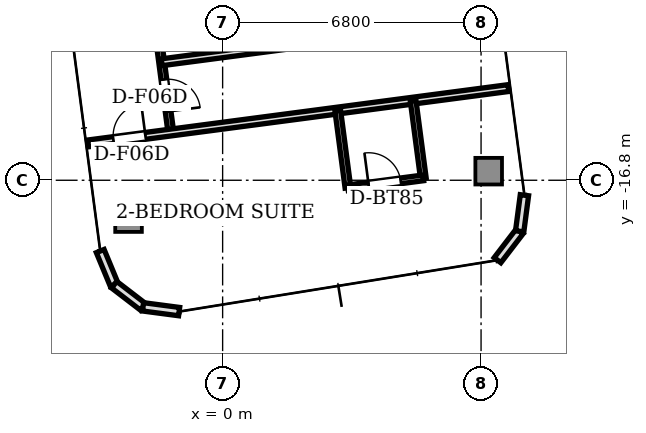
"""IFC4 building model, lengths in metres.
Left out: names, types, materials, properties, quantities, classifications, styles, units other than length and angle.
Written with IfcOpenShell. Run it as: python <this file> out.ifc"""

import sys

from ifc_helpers import new_model, si_unit, direction, frame, frame_2d, origin, origin_2d, place, context, subcontext, project, spatial, rectangle, extrude, source, transform, mapped, element, fill, save


model = new_model("IFC4")
c1 = context("Model", 3, precision=1e-05, world=origin(), true_north=direction((0.0, 1.0)))
c2 = subcontext(c1, "Body", "Model", "MODEL_VIEW")
j1 = project(units=[si_unit("LENGTHUNIT", "METRE"), si_unit("PLANEANGLEUNIT", "RADIAN")], contexts=[c1])
p1 = place(None, origin())
s1 = spatial("IfcSite", under=j1, at=p1, CompositionType="ELEMENT")
p2 = place(p1, origin())
s2 = spatial("IfcBuilding", under=s1, at=p2, CompositionType="ELEMENT")
p3 = place(p2, frame((0.0, 0.0, 234.45)))
s3 = spatial("IfcBuildingStorey", under=s2, at=p3, CompositionType="ELEMENT", Elevation=234.45)
m1 = source(origin(), c2, "Body", "SweptSolid", [
    extrude(rectangle(XDim=0.7, YDim=0.7, at=origin_2d()), origin(), (0.0, 0.0, 1.0), 3.11),
])
for number, where, z_axis, x_axis in (
    (1, (-2.476, -17.809, 0.0), (0.0, 0.0, 1.0), (1.0, 0.0, 0.0)),
    (2, (7.0, -16.561, 0.0), (0.0, 0.0, 1.0), (1.0, 0.0, 0.0)),
):
    element("IfcColumn", number, at=place(p3, frame(where, z_axis=z_axis, x_axis=x_axis)), inside=s3, PredefinedType="COLUMN", context=c2, shape_type="MappedRepresentation", body=[
        mapped(m1, transform((0.0, 0.0, 0.0), scale=1.0)),
    ])
p4 = place(p3, frame((-3.22, -18.663, 0.0), z_axis=(0.0, 0.0, 1.0), x_axis=(0.382659506909, -0.923889442397, 0.0)))
e3 = element("IfcWall", 3, at=p4, inside=s3, PredefinedType="STANDARD", context=c2, shape_type="SweptSolid", body=[
    extrude(rectangle(XDim=0.958, YDim=0.22, at=frame_2d((0.479, 0.0))), origin(), (0.0, 0.0, 1.0), 3.11),
])
for number, where, z_axis, x_axis in (
    (4, (-2.854, -19.548, 0.0), (0.0, 0.0, 1.0), (0.793, -0.609, 0.0)),
    (5, (-2.094, -20.131, 0.0), (0.0, 0.0, 1.0), (0.991, -0.131, 0.0)),
    (6, (7.233, -18.903, 0.0), (0.0, 0.0, 1.0), (0.609, 0.793, 0.0)),
):
    element("IfcWall", number, at=place(p3, frame(where, z_axis=z_axis, x_axis=x_axis)), inside=s3, PredefinedType="STANDARD", context=c2, shape_type="SweptSolid", body=[
        extrude(rectangle(XDim=0.958, YDim=0.22, at=frame_2d((0.479, 0.0))), origin(), (0.0, 0.0, 1.0), 3.11),
    ])
p5 = place(p3, frame((7.816, -18.143, 0.0), z_axis=(0.0, 0.0, 1.0), x_axis=(0.130527053476, 0.991444747987, 0.0)))
e7 = element("IfcWall", 7, at=p5, inside=s3, PredefinedType="STANDARD", context=c2, shape_type="SweptSolid", body=[
    extrude(rectangle(XDim=0.958, YDim=0.22, at=frame_2d((0.479, 0.0))), origin(), (0.0, 0.0, 1.0), 3.11),
])
p6 = place(p3, frame((-1.869, -11.694, 0.0), z_axis=(0.0, 0.0, 1.0), x_axis=(0.130524447278, -0.991445091098, 0.0)))
e8 = element("IfcWall", 8, at=p6, inside=s3, PredefinedType="PARTITIONING", context=c2, shape_type="SweptSolid", body=[
    extrude(rectangle(XDim=3.883, YDim=0.15, at=frame_2d((1.941, 0.0))), origin(), (0.0, 0.0, 1.0), 2.66),
])
p7 = place(p6, frame((0.535, 0.0, 0.0)))
e9 = element("IfcOpeningElement", 9, at=p7, cuts=e8, PredefinedType="OPENING", context=c2, shape_type="SweptSolid", body=[
    extrude(rectangle(XDim=0.85, YDim=2.1, at=frame_2d((0.425, 1.05))), frame((0.0, 0.085, 0.0), z_axis=(0.0, -1.0, 0.0), x_axis=(1.0, 0.0, 0.0)), (0.0, 0.0, 1.0), 0.17),
])
p8 = place(p6, frame((2.476, 0.0, 0.0)))
e10 = element("IfcOpeningElement", 10, at=p8, cuts=e8, PredefinedType="OPENING", context=c2, shape_type="SweptSolid", body=[
    extrude(rectangle(XDim=0.85, YDim=2.1, at=frame_2d((0.425, 1.05))), frame((0.0, 0.085, 0.0), z_axis=(0.0, -1.0, 0.0), x_axis=(1.0, 0.0, 0.0)), (0.0, 0.0, 1.0), 0.17),
])
p9 = place(p3, frame((-1.605, -13.696, 0.0), z_axis=(0.0, 0.0, 1.0), x_axis=(0.99144223206, 0.130546162284, 0.0)))
e11 = element("IfcWall", 11, at=p9, inside=s3, PredefinedType="PARTITIONING", context=c2, shape_type="SweptSolid", body=[
    extrude(rectangle(XDim=8.958, YDim=0.18, at=frame_2d((4.479, 0.0))), origin(), (0.0, 0.0, 1.0), 2.66),
])
p10 = place(p3, frame((-3.543, -15.831, 0.0), z_axis=(0.0, 0.0, 1.0), x_axis=(0.991446101459, 0.130516772493, 0.0)))
e12 = element("IfcWall", 12, at=p10, inside=s3, PredefinedType="PARTITIONING", context=c2, shape_type="SweptSolid", body=[
    extrude(rectangle(XDim=11.158, YDim=0.18, at=frame_2d((5.579, 0.0))), origin(), (0.0, 0.0, 1.0), 2.66),
])
p11 = place(p10, frame((0.675, 0.0, 0.0)))
e13 = element("IfcOpeningElement", 13, at=p11, cuts=e12, PredefinedType="OPENING", context=c2, shape_type="SweptSolid", body=[
    extrude(rectangle(XDim=0.85, YDim=2.1, at=frame_2d((0.425, 1.05))), frame((0.0, 0.1, 0.0), z_axis=(0.0, -1.0, 0.0), x_axis=(1.0, 0.0, 0.0)), (0.0, 0.0, 1.0), 0.2),
])
for number, where, z_axis, x_axis in (
    (14, (5.012, -14.705, 0.0), (0.0, 0.0, 1.0), (0.131, -0.991, 0.0)),
    (15, (3.029, -14.966, 0.0), (0.0, 0.0, 1.0), (0.131, -0.991, 0.0)),
):
    element("IfcWall", number, at=place(p3, frame(where, z_axis=z_axis, x_axis=x_axis)), inside=s3, PredefinedType="PARTITIONING", context=c2, shape_type="SweptSolid", body=[
        extrude(rectangle(XDim=2.05, YDim=0.15, at=frame_2d((1.025, 0.0))), origin(), (0.0, 0.0, 1.0), 2.66),
    ])
p12 = place(p3, frame((3.297, -16.998, 0.0), z_axis=(0.0, 0.0, 1.0), x_axis=(0.991449308994, 0.130492404742, 0.0)))
e16 = element("IfcWall", 16, at=p12, inside=s3, PredefinedType="PARTITIONING", context=c2, shape_type="SweptSolid", body=[
    extrude(rectangle(XDim=2.0, YDim=0.15, at=frame_2d((1.0, 0.0))), origin(), (0.0, 0.0, 1.0), 2.63),
])
p13 = place(p12, frame((0.55, 0.0, 0.0)))
e17 = element("IfcOpeningElement", 17, at=p13, cuts=e16, PredefinedType="OPENING", context=c2, shape_type="SweptSolid", body=[
    extrude(rectangle(XDim=0.85, YDim=2.1, at=frame_2d((0.425, 1.05))), frame((0.0, 0.085, 0.0), z_axis=(0.0, -1.0, 0.0), x_axis=(1.0, 0.0, 0.0)), (0.0, 0.0, 1.0), 0.17),
])
m2 = source(origin(), c2, "Body", "SweptSolid", [
    extrude(rectangle(XDim=0.85, YDim=0.05, at=origin_2d()), origin(), (0.0, 0.0, 1.0), 2.1),
])
p14 = place(p8, frame((0.425, 0.0, 0.0)))
e18 = element("IfcDoor", 18, at=p14, inside=s3, OperationType="SINGLE_SWING_RIGHT", PredefinedType="DOOR", context=c2, shape_type="MappedRepresentation", body=[
    mapped(m2, transform((0.0, 0.0, 0.0), scale=1.0)),
])
fill(e10, e18)
p15 = place(p13, frame((0.425, 0.0, 0.0)))
e19 = element("IfcDoor", 19, at=p15, inside=s3, OperationType="SINGLE_SWING_LEFT", PredefinedType="DOOR", context=c2, shape_type="MappedRepresentation", body=[
    mapped(m2, transform((0.0, 0.0, 0.0), scale=1.0)),
])
fill(e17, e19)
p16 = place(p11, frame((0.425, 0.0, 0.0)))
e20 = element("IfcDoor", 20, at=p16, inside=s3, OperationType="SINGLE_SWING_RIGHT", PredefinedType="DOOR", context=c2, shape_type="MappedRepresentation", body=[
    mapped(m2, transform((0.0, 0.0, 0.0), scale=1.0)),
])
fill(e13, e20)
save(model, sys.argv[1])
